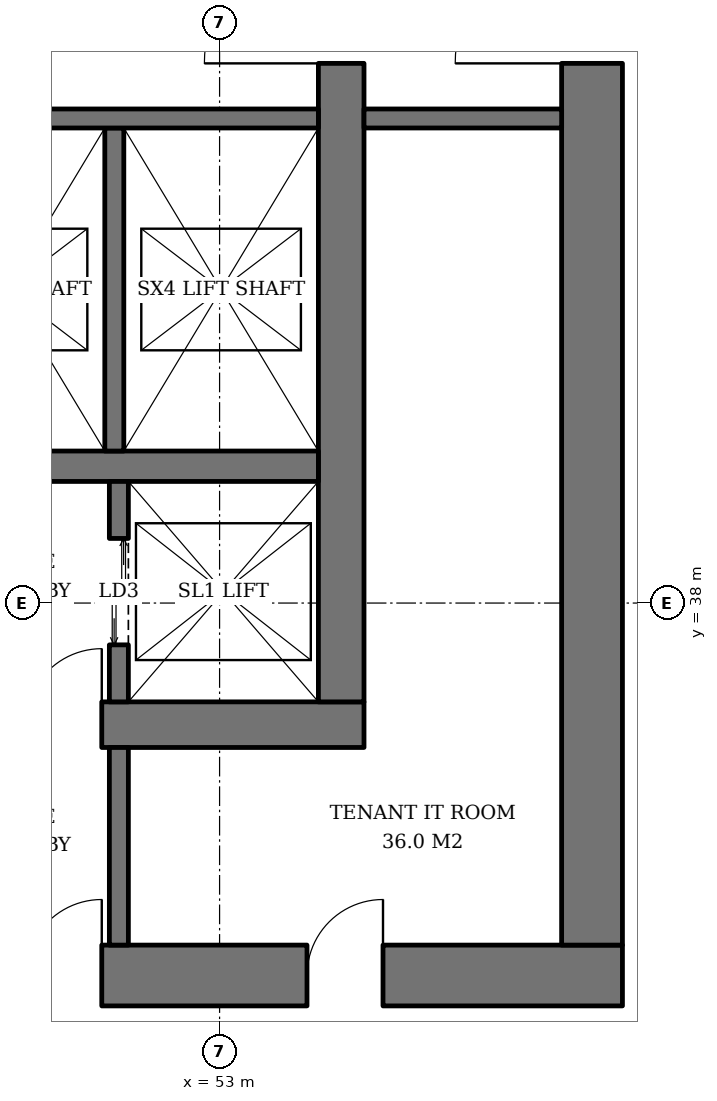
"""IFC4 building model, lengths in metres.
Left out: names, types, materials, properties, quantities, classifications, styles, units other than length and angle.
Written with IfcOpenShell. Run it as: python <this file> out.ifc"""

import sys

from ifc_helpers import new_model, si_unit, direction, frame, frame_2d, origin, place, context, subcontext, project, spatial, rectangle, extrude, element, fill, save


model = new_model("IFC4")
c1 = context("Model", 3, precision=1e-05, world=origin(), true_north=direction((0.0, 1.0)))
c2 = subcontext(c1, "Body", "Model", "MODEL_VIEW")
j1 = project(units=[si_unit("LENGTHUNIT", "METRE"), si_unit("PLANEANGLEUNIT", "RADIAN")], contexts=[c1])
p1 = place(None, origin())
s1 = spatial("IfcSite", under=j1, at=p1, CompositionType="ELEMENT")
p2 = place(p1, origin())
s2 = spatial("IfcBuilding", under=s1, at=p2, CompositionType="ELEMENT")
p3 = place(p2, frame((0.0, 0.0, 43.8)))
s3 = spatial("IfcBuildingStorey", under=s2, at=p3, CompositionType="ELEMENT", Elevation=43.8)
p4 = place(p3, frame((35.1, 36.4, 0.0), z_axis=(0.0, 0.0, 1.0), x_axis=(1.0, 0.0, 0.0)))
e1 = element("IfcWall", 1, at=p4, inside=s3, PredefinedType="SHEAR", context=c2, shape_type="SweptSolid", body=[
    extrude(rectangle(XDim=19.8, YDim=0.6, at=frame_2d((9.9, 0.0))), origin(), (0.0, 0.0, 1.0), 3.8),
])
p5 = place(p4, frame((3.9, 0.0, 0.0)))
e2 = element("IfcOpeningElement", 2, at=p5, cuts=e1, PredefinedType="OPENING", context=c2, shape_type="SweptSolid", body=[
    extrude(rectangle(XDim=1.0, YDim=2.1, at=frame_2d((0.5, 1.05))), frame((0.0, 0.31, 0.0), z_axis=(0.0, -1.0, 0.0), x_axis=(1.0, 0.0, 0.0)), (0.0, 0.0, 1.0), 0.62),
])
p6 = place(p4, frame((15.35, 0.0, 0.0)))
e3 = element("IfcOpeningElement", 3, at=p6, cuts=e1, PredefinedType="OPENING", context=c2, shape_type="SweptSolid", body=[
    extrude(rectangle(XDim=1.0, YDim=2.1, at=frame_2d((0.5, 1.05))), frame((0.0, 0.31, 0.0), z_axis=(0.0, -1.0, 0.0), x_axis=(1.0, 0.0, 0.0)), (0.0, 0.0, 1.0), 0.62),
])
p7 = place(p3, frame((54.6, 36.7, 0.0), z_axis=(0.0, 0.0, 1.0), x_axis=(0.0, 1.0, 0.0)))
e4 = element("IfcWall", 4, at=p7, inside=s3, PredefinedType="SHEAR", context=c2, shape_type="SweptSolid", body=[
    extrude(rectangle(XDim=18.6, YDim=0.6, at=frame_2d((9.3, 0.0))), origin(), (0.0, 0.0, 1.0), 3.8),
])
p8 = place(p7, frame((8.4, 0.0, 0.0)))
e5 = element("IfcOpeningElement", 5, at=p8, cuts=e4, PredefinedType="OPENING", context=c2, shape_type="SweptSolid", body=[
    extrude(rectangle(XDim=1.8, YDim=2.4, at=frame_2d((0.9, 1.2))), frame((0.0, 0.31, 0.0), z_axis=(0.0, -1.0, 0.0), x_axis=(1.0, 0.0, 0.0)), (0.0, 0.0, 1.0), 0.62),
])
p9 = place(p3, frame((31.7, 33.1, 0.0), z_axis=(0.0, 0.0, 1.0), x_axis=(1.0, 0.0, 0.0)))
e6 = element("IfcWall", 6, at=p9, inside=s3, PredefinedType="SHEAR", context=c2, shape_type="SweptSolid", body=[
    extrude(rectangle(XDim=26.6, YDim=0.8, at=frame_2d((13.3, 0.0))), origin(), (0.0, 0.0, 1.0), 3.8),
])
p10 = place(p9, frame((7.3, 0.0, 0.0)))
e7 = element("IfcOpeningElement", 7, at=p10, cuts=e6, PredefinedType="OPENING", context=c2, shape_type="SweptSolid", body=[
    extrude(rectangle(XDim=1.0, YDim=2.1, at=frame_2d((0.5, 1.05))), frame((0.0, 0.41, 0.0), z_axis=(0.0, -1.0, 0.0), x_axis=(1.0, 0.0, 0.0)), (0.0, 0.0, 1.0), 0.82),
])
p11 = place(p9, frame((18.75, 0.0, 0.0)))
e8 = element("IfcOpeningElement", 8, at=p11, cuts=e6, PredefinedType="OPENING", context=c2, shape_type="SweptSolid", body=[
    extrude(rectangle(XDim=1.0, YDim=2.1, at=frame_2d((0.5, 1.05))), frame((0.0, 0.41, 0.0), z_axis=(0.0, -1.0, 0.0), x_axis=(1.0, 0.0, 0.0)), (0.0, 0.0, 1.0), 0.82),
])
p12 = place(p9, frame((3.25, 0.0, 0.0)))
e9 = element("IfcOpeningElement", 9, at=p12, cuts=e6, PredefinedType="OPENING", context=c2, shape_type="SweptSolid", body=[
    extrude(rectangle(XDim=1.0, YDim=2.1, at=frame_2d((0.5, 1.05))), frame((0.0, 0.41, 0.0), z_axis=(0.0, -1.0, 0.0), x_axis=(1.0, 0.0, 0.0)), (0.0, 0.0, 1.0), 0.82),
])
p13 = place(p9, frame((10.42, 0.0, 0.0)))
e10 = element("IfcOpeningElement", 10, at=p13, cuts=e6, PredefinedType="OPENING", context=c2, shape_type="SweptSolid", body=[
    extrude(rectangle(XDim=1.0, YDim=2.1, at=frame_2d((0.5, 1.05))), frame((0.0, 0.41, 0.0), z_axis=(0.0, -1.0, 0.0), x_axis=(1.0, 0.0, 0.0)), (0.0, 0.0, 1.0), 0.82),
])
p14 = place(p9, frame((14.46, 0.0, 0.0)))
e11 = element("IfcOpeningElement", 11, at=p14, cuts=e6, PredefinedType="OPENING", context=c2, shape_type="SweptSolid", body=[
    extrude(rectangle(XDim=1.0, YDim=2.1, at=frame_2d((0.5, 1.05))), frame((0.0, 0.41, 0.0), z_axis=(0.0, -1.0, 0.0), x_axis=(1.0, 0.0, 0.0)), (0.0, 0.0, 1.0), 0.82),
])
p15 = place(p9, frame((22.45, 0.0, 0.0)))
e12 = element("IfcOpeningElement", 12, at=p15, cuts=e6, PredefinedType="OPENING", context=c2, shape_type="SweptSolid", body=[
    extrude(rectangle(XDim=1.0, YDim=2.1, at=frame_2d((0.5, 1.05))), frame((0.0, 0.41, 0.0), z_axis=(0.0, -1.0, 0.0), x_axis=(1.0, 0.0, 0.0)), (0.0, 0.0, 1.0), 0.82),
])
p16 = place(p3, frame((57.9, 33.5, 0.0), z_axis=(0.0, 0.0, 1.0), x_axis=(0.0, 1.0, 0.0)))
e13 = element("IfcWall", 13, at=p16, inside=s3, PredefinedType="SHEAR", context=c2, shape_type="SweptSolid", body=[
    extrude(rectangle(XDim=25.0, YDim=0.8, at=frame_2d((12.5, 0.0))), origin(), (0.0, 0.0, 1.0), 3.8),
])
p17 = place(p16, frame((11.6, 0.0, 0.0)))
e14 = element("IfcOpeningElement", 14, at=p17, cuts=e13, PredefinedType="OPENING", context=c2, shape_type="SweptSolid", body=[
    extrude(rectangle(XDim=1.8, YDim=2.4, at=frame_2d((0.9, 1.2))), frame((0.0, 0.41, 0.0), z_axis=(0.0, -1.0, 0.0), x_axis=(1.0, 0.0, 0.0)), (0.0, 0.0, 1.0), 0.82),
])
p18 = place(p3, frame((35.7, 39.8, 0.0), z_axis=(0.0, 0.0, 1.0), x_axis=(1.0, 0.0, 0.0)))
e15 = element("IfcWall", 15, at=p18, inside=s3, PredefinedType="SHEAR", context=c2, shape_type="SweptSolid", body=[
    extrude(rectangle(XDim=18.6, YDim=0.4, at=frame_2d((9.3, 0.0))), origin(), (0.0, 0.0, 1.0), 3.8),
])
p19 = place(p3, frame((51.675, 36.7, 0.0), z_axis=(0.0, 0.0, 1.0), x_axis=(0.0, 1.0, 0.0)))
e16 = element("IfcWall", 16, at=p19, inside=s3, PredefinedType="SHEAR", context=c2, shape_type="SweptSolid", body=[
    extrude(rectangle(XDim=2.9, YDim=0.25, at=frame_2d((1.45, 0.0))), origin(), (0.0, 0.0, 1.0), 3.8),
])
p20 = place(p19, frame((0.75, 0.0, 0.0)))
e17 = element("IfcOpeningElement", 17, at=p20, cuts=e16, PredefinedType="OPENING", context=c2, shape_type="SweptSolid", body=[
    extrude(rectangle(XDim=1.4, YDim=2.4, at=frame_2d((0.7, 1.2))), frame((0.0, 0.135, 0.0), z_axis=(0.0, -1.0, 0.0), x_axis=(1.0, 0.0, 0.0)), (0.0, 0.0, 1.0), 0.27),
])
p21 = place(p3, frame((51.615, 44.25, 0.0), z_axis=(0.0, 0.0, 1.0), x_axis=(0.0, -1.0, 0.0)))
e18 = element("IfcWall", 18, at=p21, inside=s3, PredefinedType="SHEAR", context=c2, shape_type="SweptSolid", body=[
    extrude(rectangle(XDim=4.25, YDim=0.25, at=frame_2d((2.125, 0.0))), origin(), (0.0, 0.0, 1.0), 3.8),
])
p22 = place(p3, frame((48.93, 44.375, 0.0), z_axis=(0.0, 0.0, 1.0), x_axis=(1.0, 0.0, 0.0)))
e19 = element("IfcWall", 19, at=p22, inside=s3, PredefinedType="SHEAR", context=c2, shape_type="SweptSolid", body=[
    extrude(rectangle(XDim=5.37, YDim=0.25, at=frame_2d((2.685, 0.0))), origin(), (0.0, 0.0, 1.0), 3.8),
])
for number, where, z_axis, x_axis in (
    (20, (54.9, 44.375, 0.0), (0.0, 0.0, 1.0), (1.0, 0.0, 0.0)),
    (21, (51.675, 33.5, 0.0), (0.0, 0.0, 1.0), (0.0, 1.0, 0.0)),
):
    element("IfcWall", number, at=place(p3, frame(where, z_axis=z_axis, x_axis=x_axis)), inside=s3, PredefinedType="SOLIDWALL", context=c2, shape_type="SweptSolid", body=[
        extrude(rectangle(XDim=2.6, YDim=0.25, at=frame_2d((1.3, 0.0))), origin(), (0.0, 0.0, 1.0), 3.62),
    ])
p23 = place(p20, origin())
e22 = element("IfcDoor", 22, at=p23, inside=s3, OperationType="DOUBLE_DOOR_SLIDING", PredefinedType="DOOR", context=c2, shape_type="SweptSolid", body=[
    extrude(rectangle(XDim=1.4, YDim=2.4, at=frame_2d((0.7, 1.2))), frame((0.0, 0.025, 0.0), z_axis=(0.0, -1.0, 0.0), x_axis=(1.0, 0.0, 0.0)), (0.0, 0.0, 1.0), 0.05),
])
fill(e17, e22)
p24 = place(p8, origin())
e23 = element("IfcDoor", 23, at=p24, inside=s3, OperationType="DOUBLE_DOOR_SINGLE_SWING", PredefinedType="DOOR", context=c2, shape_type="SweptSolid", body=[
    extrude(rectangle(XDim=1.8, YDim=2.4, at=frame_2d((0.9, 1.2))), frame((0.0, 0.025, 0.0), z_axis=(0.0, -1.0, 0.0), x_axis=(1.0, 0.0, 0.0)), (0.0, 0.0, 1.0), 0.05),
])
fill(e5, e23)
p25 = place(p6, origin())
e24 = element("IfcDoor", 24, at=p25, inside=s3, OperationType="SINGLE_SWING_RIGHT", PredefinedType="DOOR", context=c2, shape_type="SweptSolid", body=[
    extrude(rectangle(XDim=1.0, YDim=2.1, at=frame_2d((0.5, 1.05))), frame((0.0, 0.025, 0.0), z_axis=(0.0, -1.0, 0.0), x_axis=(1.0, 0.0, 0.0)), (0.0, 0.0, 1.0), 0.05),
])
fill(e3, e24)
p26 = place(p17, origin())
e25 = element("IfcDoor", 25, at=p26, inside=s3, OperationType="DOUBLE_DOOR_SINGLE_SWING", PredefinedType="DOOR", context=c2, shape_type="SweptSolid", body=[
    extrude(rectangle(XDim=1.8, YDim=2.4, at=frame_2d((0.9, 1.2))), frame((0.0, 0.025, 0.0), z_axis=(0.0, -1.0, 0.0), x_axis=(1.0, 0.0, 0.0)), (0.0, 0.0, 1.0), 0.05),
])
fill(e14, e25)
p27 = place(p11, origin())
e26 = element("IfcDoor", 26, at=p27, inside=s3, OperationType="SINGLE_SWING_RIGHT", PredefinedType="DOOR", context=c2, shape_type="SweptSolid", body=[
    extrude(rectangle(XDim=1.0, YDim=2.1, at=frame_2d((0.5, 1.05))), frame((0.0, 0.025, 0.0), z_axis=(0.0, -1.0, 0.0), x_axis=(1.0, 0.0, 0.0)), (0.0, 0.0, 1.0), 0.05),
])
fill(e8, e26)
p28 = place(p15, origin())
e27 = element("IfcDoor", 27, at=p28, inside=s3, OperationType="SINGLE_SWING_RIGHT", PredefinedType="DOOR", context=c2, shape_type="SweptSolid", body=[
    extrude(rectangle(XDim=1.0, YDim=2.1, at=frame_2d((0.5, 1.05))), frame((0.0, 0.39, 0.0), z_axis=(0.0, -1.0, 0.0), x_axis=(1.0, 0.0, 0.0)), (0.0, 0.0, 1.0), 0.05),
])
fill(e12, e27)
save(model, sys.argv[1])
